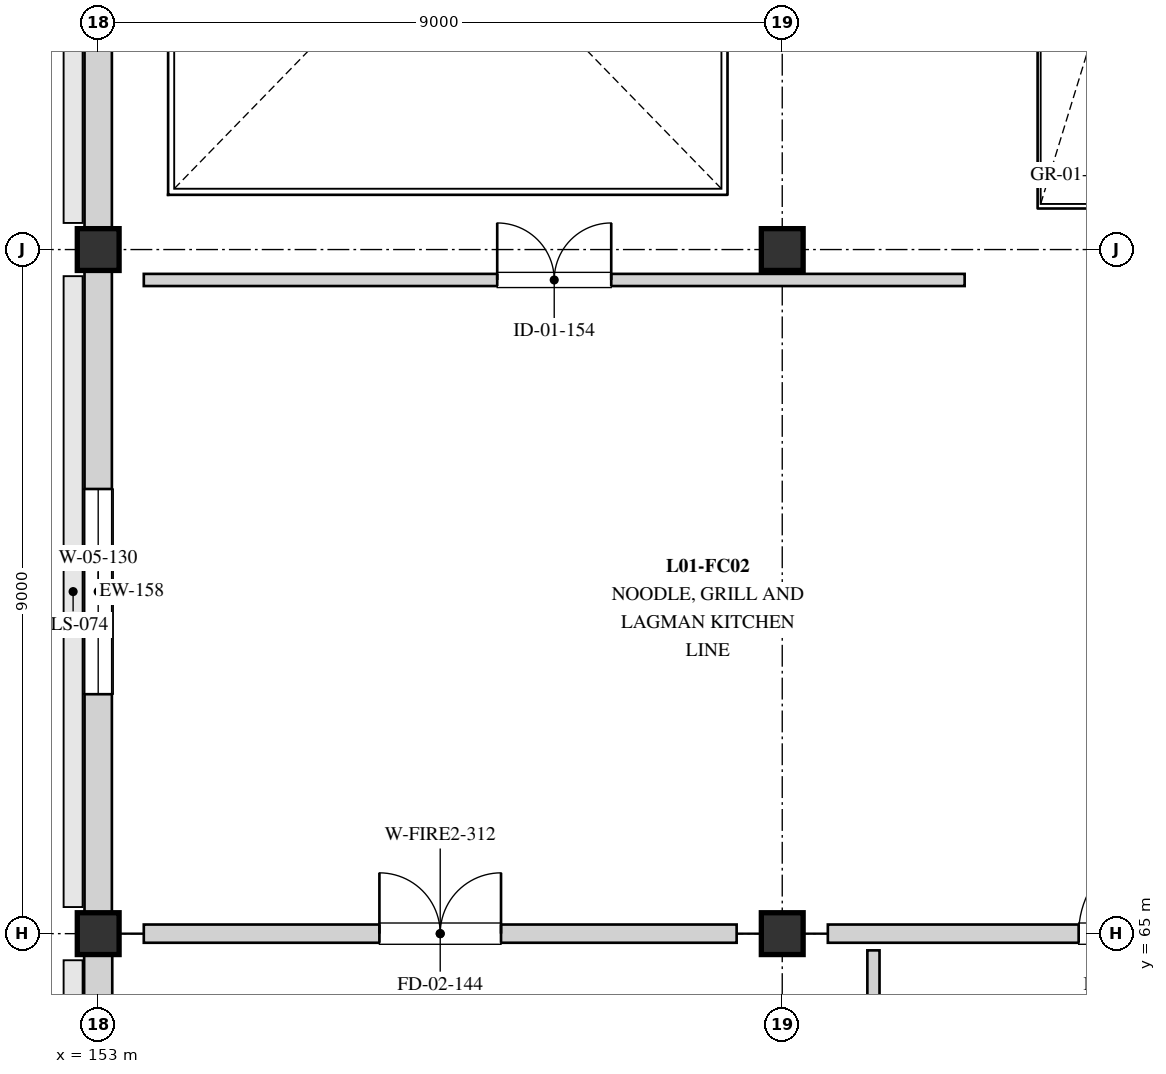
"""IFC4 building model, lengths in metres.
Left out: names, types, materials, properties, quantities, classifications, styles, units other than length and angle.
Written with IfcOpenShell. Run it as: python <this file> out.ifc"""

import sys

from ifc_helpers import new_model, si_unit, direction, frame, frame_2d, origin, origin_2d, place, context, subcontext, project, spatial, rectangle, extrude, element, fill, save


model = new_model("IFC4")
c1 = context("Model", 3, precision=1e-05, world=origin(), true_north=direction((0.0, 1.0)))
c2 = subcontext(c1, "Body", "Model", "MODEL_VIEW")
j1 = project(units=[si_unit("LENGTHUNIT", "METRE"), si_unit("PLANEANGLEUNIT", "RADIAN")], contexts=[c1])
p1 = place(None, origin())
s1 = spatial("IfcSite", under=j1, at=p1, CompositionType="ELEMENT")
p2 = place(p1, origin())
s2 = spatial("IfcBuilding", under=s1, at=p2, CompositionType="ELEMENT")
p3 = place(p2, frame((0.0, 0.0, 4.5)))
s3 = spatial("IfcBuildingStorey", under=s2, at=p3, CompositionType="ELEMENT", Elevation=4.5)
for number, where, z_axis, x_axis in (
    (1, (153.0, 65.0, 0.0), (0.0, 0.0, 1.0), (1.0, 0.0, 0.0)),
    (2, (153.0, 74.0, 0.0), (0.0, 0.0, 1.0), (1.0, 0.0, 0.0)),
    (3, (162.0, 65.0, 0.0), (0.0, 0.0, 1.0), (1.0, 0.0, 0.0)),
    (4, (162.0, 74.0, 0.0), (0.0, 0.0, 1.0), (1.0, 0.0, 0.0)),
):
    element("IfcColumn", number, at=place(p3, frame(where, z_axis=z_axis, x_axis=x_axis)), inside=s3, PredefinedType="COLUMN", context=c2, shape_type="SweptSolid", body=[
        extrude(rectangle(XDim=0.55, YDim=0.55, at=origin_2d()), origin(), (0.0, 0.0, 1.0), 3.9),
    ])
p4 = place(p3, frame((153.0, 65.0, 0.0), z_axis=(0.0, 0.0, 1.0), x_axis=(0.0, 1.0, 0.0)))
e5 = element("IfcWall", 5, at=p4, inside=s3, PredefinedType="STANDARD", context=c2, shape_type="SweptSolid", body=[
    extrude(rectangle(XDim=9.0, YDim=0.36, at=frame_2d((4.5, 0.0))), origin(), (0.0, 0.0, 1.0), 2.76),
])
p5 = place(p4, frame((3.15, 0.0, 0.35)))
e6 = element("IfcOpeningElement", 6, at=p5, cuts=e5, PredefinedType="OPENING", context=c2, shape_type="SweptSolid", body=[
    extrude(rectangle(XDim=2.7, YDim=2.22, at=frame_2d((1.35, 1.11))), frame((0.0, 0.19, 0.0), z_axis=(0.0, -1.0, 0.0), x_axis=(1.0, 0.0, 0.0)), (0.0, 0.0, 1.0), 0.38),
])
p6 = place(p3, frame((153.0, 74.0, 0.0), z_axis=(0.0, 0.0, 1.0), x_axis=(0.0, 1.0, 0.0)))
e7 = element("IfcWall", 7, at=p6, inside=s3, PredefinedType="STANDARD", context=c2, shape_type="SweptSolid", body=[
    extrude(rectangle(XDim=9.0, YDim=0.36, at=frame_2d((4.5, 0.0))), origin(), (0.0, 0.0, 1.0), 2.76),
])
p7 = place(p6, frame((3.45, 0.0, 0.37)))
e8 = element("IfcOpeningElement", 8, at=p7, cuts=e7, PredefinedType="OPENING", context=c2, shape_type="SweptSolid", body=[
    extrude(rectangle(XDim=2.1, YDim=2.2, at=frame_2d((1.05, 1.1))), frame((0.0, 0.19, 0.0), z_axis=(0.0, -1.0, 0.0), x_axis=(1.0, 0.0, 0.0)), (0.0, 0.0, 1.0), 0.38),
])
p8 = place(p3, frame((153.0, 56.0, 0.0), z_axis=(0.0, 0.0, 1.0), x_axis=(0.0, 1.0, 0.0)))
e9 = element("IfcWall", 9, at=p8, inside=s3, PredefinedType="STANDARD", context=c2, shape_type="SweptSolid", body=[
    extrude(rectangle(XDim=9.0, YDim=0.37, at=frame_2d((4.5, 0.0))), origin(), (0.0, 0.0, 1.0), 2.76),
])
p9 = place(p8, frame((3.9, 0.0, 0.78)))
e10 = element("IfcOpeningElement", 10, at=p9, cuts=e9, PredefinedType="OPENING", context=c2, shape_type="SweptSolid", body=[
    extrude(rectangle(XDim=1.2, YDim=1.8, at=frame_2d((0.6, 0.9))), frame((0.0, 0.195, 0.0), z_axis=(0.0, -1.0, 0.0), x_axis=(1.0, 0.0, 0.0)), (0.0, 0.0, 1.0), 0.39),
])
p10 = place(p3, frame((153.6, 65.0, 0.0), z_axis=(0.0, 0.0, 1.0), x_axis=(1.0, 0.0, 0.0)))
e11 = element("IfcWall", 11, at=p10, inside=s3, PredefinedType="SOLIDWALL", context=c2, shape_type="SweptSolid", body=[
    extrude(rectangle(XDim=7.8, YDim=0.24, at=frame_2d((3.9, 0.0))), origin(), (0.0, 0.0, 1.0), 2.65),
])
p11 = place(p10, frame((3.1, 0.0, 0.0)))
e12 = element("IfcOpeningElement", 12, at=p11, cuts=e11, PredefinedType="OPENING", context=c2, shape_type="SweptSolid", body=[
    extrude(rectangle(XDim=1.6, YDim=2.2, at=frame_2d((0.8, 1.1))), frame((0.0, 0.13, 0.0), z_axis=(0.0, -1.0, 0.0), x_axis=(1.0, 0.0, 0.0)), (0.0, 0.0, 1.0), 0.26),
])
p12 = place(p3, frame((162.6, 65.0, 0.0), z_axis=(0.0, 0.0, 1.0), x_axis=(1.0, 0.0, 0.0)))
e13 = element("IfcWall", 13, at=p12, inside=s3, PredefinedType="SOLIDWALL", context=c2, shape_type="SweptSolid", body=[
    extrude(rectangle(XDim=7.8, YDim=0.24, at=frame_2d((3.9, 0.0))), origin(), (0.0, 0.0, 1.0), 2.65),
])
p13 = place(p12, frame((3.3, 0.0, 0.0)))
e14 = element("IfcOpeningElement", 14, at=p13, cuts=e13, PredefinedType="OPENING", context=c2, shape_type="SweptSolid", body=[
    extrude(rectangle(XDim=1.2, YDim=2.15, at=frame_2d((0.6, 1.075))), frame((0.0, 0.13, 0.0), z_axis=(0.0, -1.0, 0.0), x_axis=(1.0, 0.0, 0.0)), (0.0, 0.0, 1.0), 0.26),
])
p14 = place(p3, frame((163.2, 56.22, 0.0), z_axis=(0.0, 0.0, 1.0), x_axis=(0.0, 1.0, 0.0)))
e15 = element("IfcWall", 15, at=p14, inside=s3, PredefinedType="PARTITIONING", context=c2, shape_type="SweptSolid", body=[
    extrude(rectangle(XDim=8.56, YDim=0.16, at=frame_2d((4.28, 0.0))), origin(), (0.0, 0.0, 1.0), 2.65),
])
p15 = place(p14, frame((1.1, 0.0, 0.0)))
e16 = element("IfcOpeningElement", 16, at=p15, cuts=e15, PredefinedType="OPENING", context=c2, shape_type="SweptSolid", body=[
    extrude(rectangle(XDim=1.5, YDim=2.25, at=frame_2d((0.75, 1.125))), frame((0.0, 0.09, 0.0), z_axis=(0.0, -1.0, 0.0), x_axis=(1.0, 0.0, 0.0)), (0.0, 0.0, 1.0), 0.18),
])
p16 = place(p3, frame((153.6, 73.6, 0.0), z_axis=(0.0, 0.0, 1.0), x_axis=(1.0, 0.0, 0.0)))
e17 = element("IfcWall", 17, at=p16, inside=s3, PredefinedType="PARTITIONING", context=c2, shape_type="SweptSolid", body=[
    extrude(rectangle(XDim=10.8, YDim=0.16, at=frame_2d((5.4, 0.0))), origin(), (0.0, 0.0, 1.0), 2.65),
])
p17 = place(p16, frame((4.65, 0.0, 0.0)))
e18 = element("IfcOpeningElement", 18, at=p17, cuts=e17, PredefinedType="OPENING", context=c2, shape_type="SweptSolid", body=[
    extrude(rectangle(XDim=1.5, YDim=2.25, at=frame_2d((0.75, 1.125))), frame((0.0, 0.09, 0.0), z_axis=(0.0, -1.0, 0.0), x_axis=(1.0, 0.0, 0.0)), (0.0, 0.0, 1.0), 0.18),
])
p18 = place(p5, origin())
e19 = element("IfcWindow", 19, at=p18, inside=s3, PartitioningType="SINGLE_PANEL", PredefinedType="WINDOW", context=c2, shape_type="SweptSolid", body=[
    extrude(rectangle(XDim=2.7, YDim=2.22, at=frame_2d((1.35, 1.11))), frame((0.0, 0.03, 0.0), z_axis=(0.0, -1.0, 0.0), x_axis=(1.0, 0.0, 0.0)), (0.0, 0.0, 1.0), 0.06),
])
fill(e6, e19)
p19 = place(p11, origin())
e20 = element("IfcDoor", 20, at=p19, inside=s3, OperationType="DOUBLE_DOOR_SINGLE_SWING", PredefinedType="DOOR", context=c2, shape_type="SweptSolid", body=[
    extrude(rectangle(XDim=1.6, YDim=2.2, at=frame_2d((0.8, 1.1))), frame((0.0, 0.025, 0.0), z_axis=(0.0, -1.0, 0.0), x_axis=(1.0, 0.0, 0.0)), (0.0, 0.0, 1.0), 0.05),
])
fill(e12, e20)
p20 = place(p13, origin())
e21 = element("IfcDoor", 21, at=p20, inside=s3, OperationType="SINGLE_SWING_RIGHT", PredefinedType="DOOR", context=c2, shape_type="SweptSolid", body=[
    extrude(rectangle(XDim=1.2, YDim=2.15, at=frame_2d((0.6, 1.075))), frame((0.0, 0.025, 0.0), z_axis=(0.0, -1.0, 0.0), x_axis=(1.0, 0.0, 0.0)), (0.0, 0.0, 1.0), 0.05),
])
fill(e14, e21)
p21 = place(p17, origin())
e22 = element("IfcDoor", 22, at=p21, inside=s3, OperationType="DOUBLE_DOOR_SINGLE_SWING", PredefinedType="DOOR", context=c2, shape_type="SweptSolid", body=[
    extrude(rectangle(XDim=1.5, YDim=2.25, at=frame_2d((0.75, 1.125))), frame((0.0, 0.025, 0.0), z_axis=(0.0, -1.0, 0.0), x_axis=(1.0, 0.0, 0.0)), (0.0, 0.0, 1.0), 0.05),
])
fill(e18, e22)
save(model, sys.argv[1])
